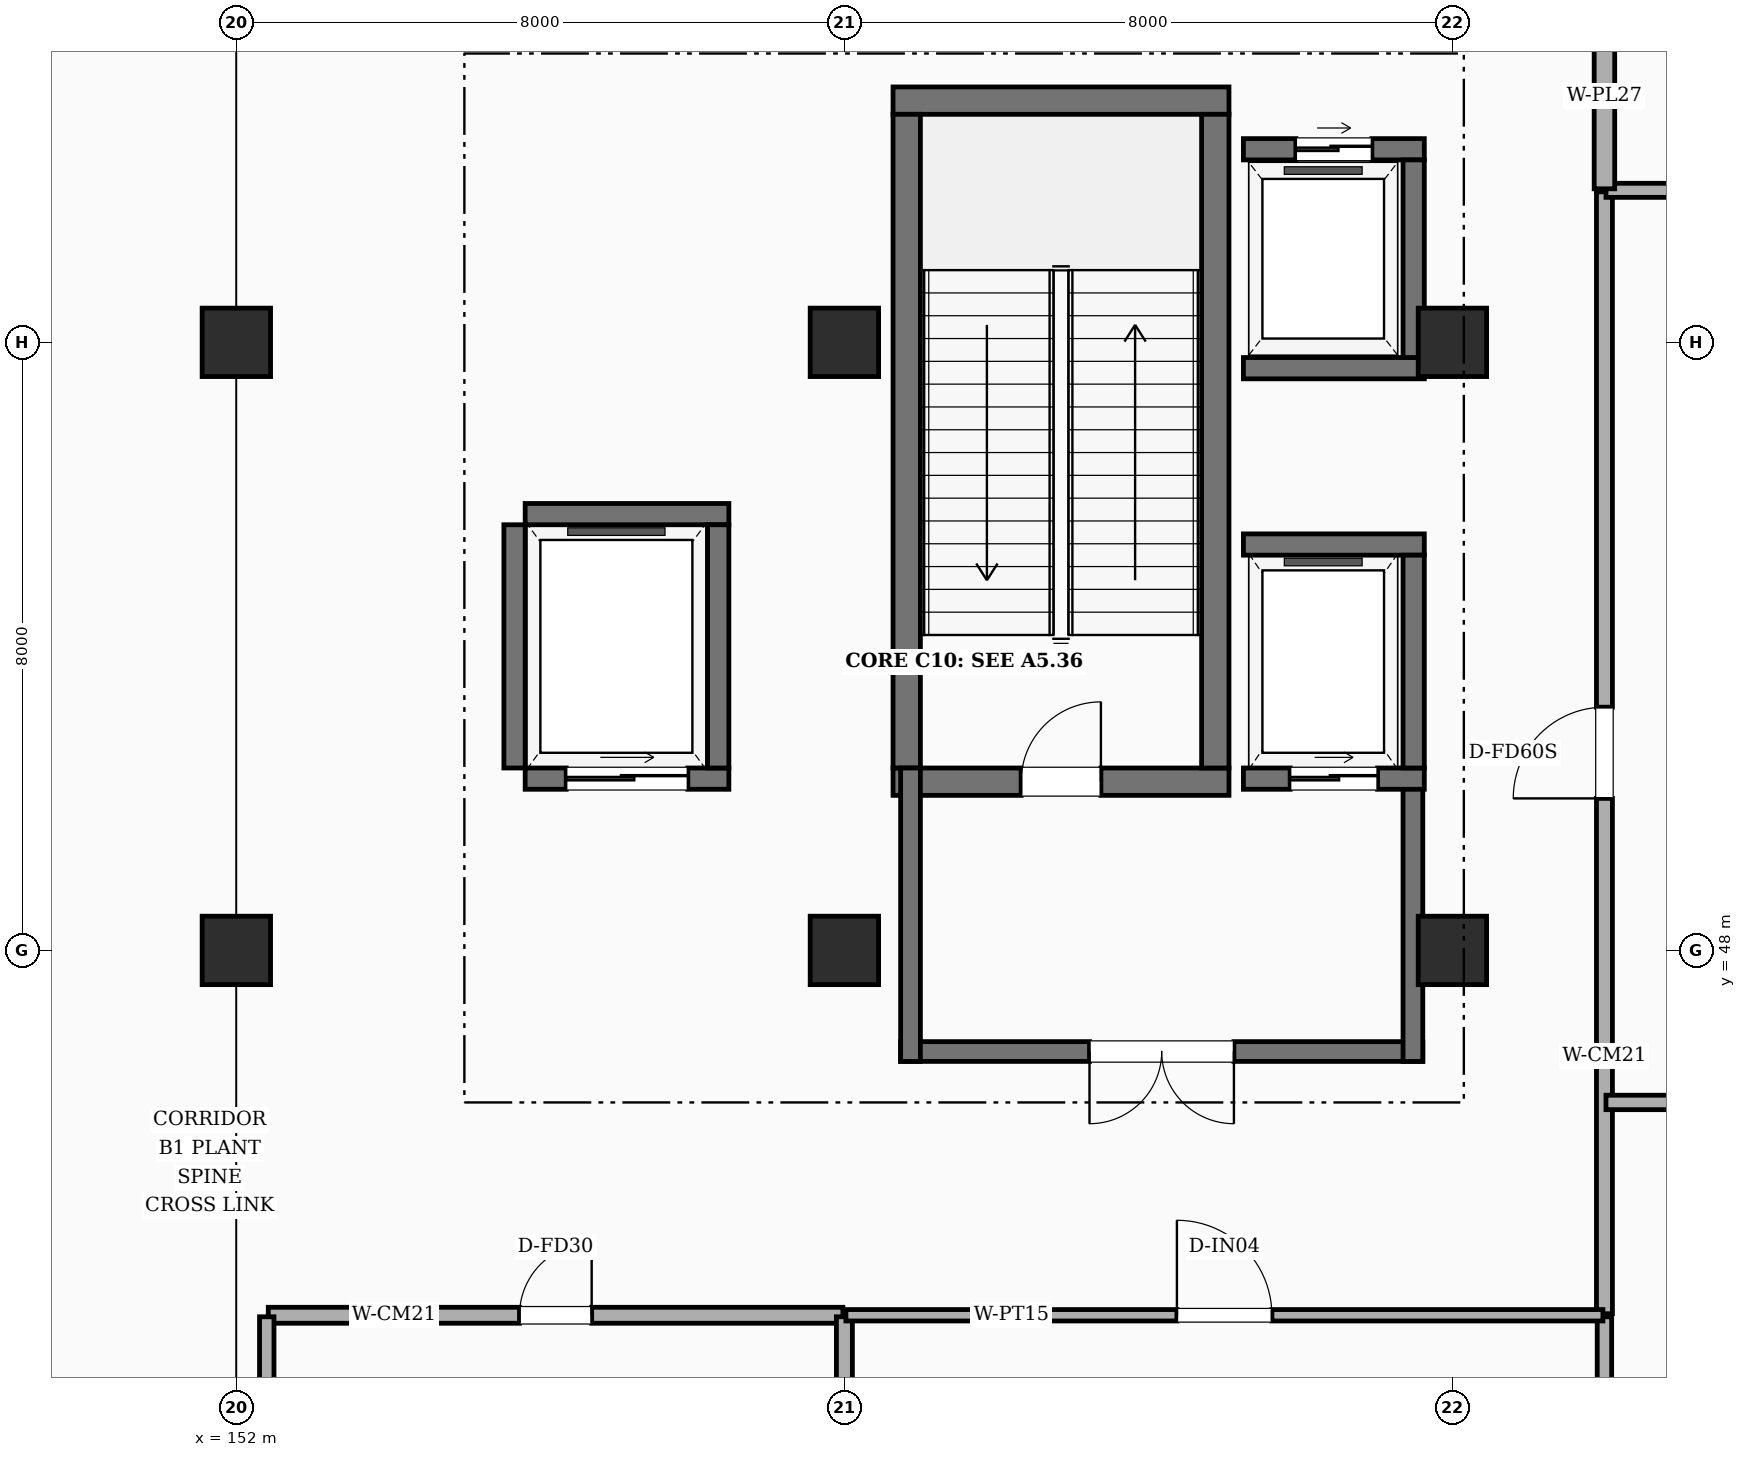
"""IFC4 building model, lengths in metres.
Left out: names, types, materials, properties, quantities, classifications, styles, units other than length and angle.
Written with IfcOpenShell. Run it as: python <this file> out.ifc"""

import sys

from ifc_helpers import new_model, si_unit, direction, frame, frame_2d, origin, origin_2d, place, context, subcontext, project, spatial, rectangle, extrude, element, fill, save


model = new_model("IFC4")
c1 = context("Model", 3, precision=1e-05, world=origin(), true_north=direction((0.0, 1.0)))
c2 = subcontext(c1, "Body", "Model", "MODEL_VIEW")
j1 = project(units=[si_unit("LENGTHUNIT", "METRE"), si_unit("PLANEANGLEUNIT", "RADIAN")], contexts=[c1])
p1 = place(None, origin())
s1 = spatial("IfcSite", under=j1, at=p1, CompositionType="ELEMENT")
p2 = place(p1, origin())
s2 = spatial("IfcBuilding", under=s1, at=p2, CompositionType="ELEMENT")
p3 = place(p2, frame((0.0, 0.0, -5.4)))
s3 = spatial("IfcBuildingStorey", under=s2, at=p3, CompositionType="ELEMENT", Elevation=-5.4)
for number, where, z_axis, x_axis in (
    (1, (152.0, 48.0, -0.4), (0.0, 0.0, 1.0), (1.0, 0.0, 0.0)),
    (2, (152.0, 56.0, -0.4), (0.0, 0.0, 1.0), (1.0, 0.0, 0.0)),
    (3, (160.0, 48.0, -0.4), (0.0, 0.0, 1.0), (1.0, 0.0, 0.0)),
    (4, (160.0, 56.0, -0.4), (0.0, 0.0, 1.0), (1.0, 0.0, 0.0)),
    (5, (168.0, 48.0, -0.4), (0.0, 0.0, 1.0), (1.0, 0.0, 0.0)),
    (6, (168.0, 56.0, -0.4), (0.0, 0.0, 1.0), (1.0, 0.0, 0.0)),
):
    element("IfcColumn", number, at=place(p3, frame(where, z_axis=z_axis, x_axis=x_axis)), inside=s3, PredefinedType="COLUMN", context=c2, shape_type="SweptSolid", body=[
        extrude(rectangle(XDim=0.9, YDim=0.9, at=origin_2d()), origin(), (0.0, 0.0, 1.0), 5.8),
    ])
p4 = place(p3, frame((160.64, 50.22, 0.0), z_axis=(0.0, 0.0, 1.0), x_axis=(1.0, 0.0, 0.0)))
e7 = element("IfcWall", 7, at=p4, inside=s3, PredefinedType="SHEAR", context=c2, shape_type="SweptSolid", body=[
    extrude(rectangle(XDim=4.42, YDim=0.36, at=frame_2d((2.21, 0.0))), origin(), (0.0, 0.0, 1.0), 5.4),
])
p5 = place(p4, frame((1.685, 0.0, 0.0)))
e8 = element("IfcOpeningElement", 8, at=p5, cuts=e7, PredefinedType="OPENING", context=c2, shape_type="SweptSolid", body=[
    extrude(rectangle(XDim=1.05, YDim=2.15, at=frame_2d((0.525, 1.075))), frame((0.0, 0.19, 0.0), z_axis=(0.0, -1.0, 0.0), x_axis=(1.0, 0.0, 0.0)), (0.0, 0.0, 1.0), 0.38),
])
p6 = place(p3, frame((160.64, 59.18, 0.0), z_axis=(0.0, 0.0, 1.0), x_axis=(1.0, 0.0, 0.0)))
e9 = element("IfcWall", 9, at=p6, inside=s3, PredefinedType="SHEAR", context=c2, shape_type="SweptSolid", body=[
    extrude(rectangle(XDim=4.42, YDim=0.36, at=frame_2d((2.21, 0.0))), origin(), (0.0, 0.0, 1.0), 5.4),
])
for number, where, z_axis, x_axis in (
    (10, (160.82, 50.4, 0.0), (0.0, 0.0, 1.0), (0.0, 1.0, 0.0)),
    (11, (164.88, 50.4, 0.0), (0.0, 0.0, 1.0), (0.0, 1.0, 0.0)),
):
    element("IfcWall", number, at=place(p3, frame(where, z_axis=z_axis, x_axis=x_axis)), inside=s3, PredefinedType="SHEAR", context=c2, shape_type="SweptSolid", body=[
        extrude(rectangle(XDim=8.6, YDim=0.36, at=frame_2d((4.3, 0.0))), origin(), (0.0, 0.0, 1.0), 5.4),
    ])
p7 = place(p3, frame((167.61, 46.67, 0.0), z_axis=(0.0, 0.0, 1.0), x_axis=(-1.0, 0.0, 0.0)))
e12 = element("IfcWall", 12, at=p7, inside=s3, PredefinedType="SHEAR", context=c2, shape_type="SweptSolid", body=[
    extrude(rectangle(XDim=6.87, YDim=0.26, at=frame_2d((3.435, 0.0))), origin(), (0.0, 0.0, 1.0), 5.4),
])
p8 = place(p7, frame((2.485, 0.0, 0.0)))
e13 = element("IfcOpeningElement", 13, at=p8, cuts=e12, PredefinedType="OPENING", context=c2, shape_type="SweptSolid", body=[
    extrude(rectangle(XDim=1.9, YDim=2.25, at=frame_2d((0.95, 1.125))), frame((0.0, 0.14, 0.0), z_axis=(0.0, -1.0, 0.0), x_axis=(1.0, 0.0, 0.0)), (0.0, 0.0, 1.0), 0.28),
])
for number, where, z_axis, x_axis in (
    (14, (160.87, 46.54, 0.0), (0.0, 0.0, 1.0), (0.0, 1.0, 0.0)),
    (15, (167.48, 46.54, 0.0), (0.0, 0.0, 1.0), (0.0, 1.0, 0.0)),
):
    element("IfcWall", number, at=place(p3, frame(where, z_axis=z_axis, x_axis=x_axis)), inside=s3, PredefinedType="SHEAR", context=c2, shape_type="SweptSolid", body=[
        extrude(rectangle(XDim=3.86, YDim=0.26, at=frame_2d((1.93, 0.0))), origin(), (0.0, 0.0, 1.0), 5.4),
    ])
p9 = place(p3, frame((165.25, 50.26, 0.0), z_axis=(0.0, 0.0, 1.0), x_axis=(1.0, 0.0, 0.0)))
e16 = element("IfcWall", 16, at=p9, inside=s3, PredefinedType="SHEAR", context=c2, shape_type="SweptSolid", body=[
    extrude(rectangle(XDim=2.38, YDim=0.28, at=frame_2d((1.19, 0.0))), origin(), (0.0, 0.0, 1.0), 5.4),
])
p10 = place(p9, frame((0.615, 0.0, 0.0)))
e17 = element("IfcOpeningElement", 17, at=p10, cuts=e16, PredefinedType="OPENING", context=c2, shape_type="SweptSolid", body=[
    extrude(rectangle(XDim=1.15, YDim=2.2, at=frame_2d((0.575, 1.1))), frame((0.0, 0.15, 0.0), z_axis=(0.0, -1.0, 0.0), x_axis=(1.0, 0.0, 0.0)), (0.0, 0.0, 1.0), 0.3),
])
p11 = place(p3, frame((165.25, 53.34, 0.0), z_axis=(0.0, 0.0, 1.0), x_axis=(1.0, 0.0, 0.0)))
e18 = element("IfcWall", 18, at=p11, inside=s3, PredefinedType="SHEAR", context=c2, shape_type="SweptSolid", body=[
    extrude(rectangle(XDim=2.38, YDim=0.28, at=frame_2d((1.19, 0.0))), origin(), (0.0, 0.0, 1.0), 5.4),
])
p12 = place(p3, frame((167.49, 50.4, 0.0), z_axis=(0.0, 0.0, 1.0), x_axis=(0.0, 1.0, 0.0)))
e19 = element("IfcWall", 19, at=p12, inside=s3, PredefinedType="SHEAR", context=c2, shape_type="SweptSolid", body=[
    extrude(rectangle(XDim=2.8, YDim=0.28, at=frame_2d((1.4, 0.0))), origin(), (0.0, 0.0, 1.0), 5.4),
])
p13 = place(p3, frame((165.25, 55.66, 0.0), z_axis=(0.0, 0.0, 1.0), x_axis=(1.0, 0.0, 0.0)))
e20 = element("IfcWall", 20, at=p13, inside=s3, PredefinedType="SHEAR", context=c2, shape_type="SweptSolid", body=[
    extrude(rectangle(XDim=2.38, YDim=0.28, at=frame_2d((1.19, 0.0))), origin(), (0.0, 0.0, 1.0), 5.4),
])
p14 = place(p3, frame((165.25, 58.54, 0.0), z_axis=(0.0, 0.0, 1.0), x_axis=(1.0, 0.0, 0.0)))
e21 = element("IfcWall", 21, at=p14, inside=s3, PredefinedType="SHEAR", context=c2, shape_type="SweptSolid", body=[
    extrude(rectangle(XDim=2.38, YDim=0.28, at=frame_2d((1.19, 0.0))), origin(), (0.0, 0.0, 1.0), 5.4),
])
p15 = place(p14, frame((0.69, 0.0, 0.0)))
e22 = element("IfcOpeningElement", 22, at=p15, cuts=e21, PredefinedType="OPENING", context=c2, shape_type="SweptSolid", body=[
    extrude(rectangle(XDim=1.0, YDim=2.15, at=frame_2d((0.5, 1.075))), frame((0.0, 0.15, 0.0), z_axis=(0.0, -1.0, 0.0), x_axis=(1.0, 0.0, 0.0)), (0.0, 0.0, 1.0), 0.3),
])
p16 = place(p3, frame((167.49, 55.8, 0.0), z_axis=(0.0, 0.0, 1.0), x_axis=(0.0, 1.0, 0.0)))
e23 = element("IfcWall", 23, at=p16, inside=s3, PredefinedType="SHEAR", context=c2, shape_type="SweptSolid", body=[
    extrude(rectangle(XDim=2.6, YDim=0.28, at=frame_2d((1.3, 0.0))), origin(), (0.0, 0.0, 1.0), 5.4),
])
p17 = place(p3, frame((155.8, 50.26, 0.0), z_axis=(0.0, 0.0, 1.0), x_axis=(1.0, 0.0, 0.0)))
e24 = element("IfcWall", 24, at=p17, inside=s3, PredefinedType="SHEAR", context=c2, shape_type="SweptSolid", body=[
    extrude(rectangle(XDim=2.68, YDim=0.28, at=frame_2d((1.34, 0.0))), origin(), (0.0, 0.0, 1.0), 5.4),
])
p18 = place(p17, frame((0.54, 0.0, 0.0)))
e25 = element("IfcOpeningElement", 25, at=p18, cuts=e24, PredefinedType="OPENING", context=c2, shape_type="SweptSolid", body=[
    extrude(rectangle(XDim=1.6, YDim=2.35, at=frame_2d((0.8, 1.175))), frame((0.0, 0.15, 0.0), z_axis=(0.0, -1.0, 0.0), x_axis=(1.0, 0.0, 0.0)), (0.0, 0.0, 1.0), 0.3),
])
p19 = place(p3, frame((155.8, 53.74, 0.0), z_axis=(0.0, 0.0, 1.0), x_axis=(1.0, 0.0, 0.0)))
e26 = element("IfcWall", 26, at=p19, inside=s3, PredefinedType="SHEAR", context=c2, shape_type="SweptSolid", body=[
    extrude(rectangle(XDim=2.68, YDim=0.28, at=frame_2d((1.34, 0.0))), origin(), (0.0, 0.0, 1.0), 5.4),
])
for number, where, z_axis, x_axis in (
    (27, (158.34, 50.4, 0.0), (0.0, 0.0, 1.0), (0.0, 1.0, 0.0)),
    (28, (155.66, 50.4, 0.0), (0.0, 0.0, 1.0), (0.0, 1.0, 0.0)),
):
    element("IfcWall", number, at=place(p3, frame(where, z_axis=z_axis, x_axis=x_axis)), inside=s3, PredefinedType="SHEAR", context=c2, shape_type="SweptSolid", body=[
        extrude(rectangle(XDim=3.2, YDim=0.28, at=frame_2d((1.6, 0.0))), origin(), (0.0, 0.0, 1.0), 5.4),
    ])
p20 = place(p3, frame((170.0, 24.02, 0.0), z_axis=(0.0, 0.0, 1.0), x_axis=(0.0, 1.0, 0.0)))
e29 = element("IfcWall", 29, at=p20, inside=s3, PredefinedType="SOLIDWALL", context=c2, shape_type="SweptSolid", body=[
    extrude(rectangle(XDim=19.16, YDim=0.19, at=frame_2d((9.58, 0.0))), origin(), (0.0, 0.0, 1.0), 4.11),
])
p21 = place(p20, frame((8.93, 0.0, 0.0)))
e30 = element("IfcOpeningElement", 30, at=p21, cuts=e29, PredefinedType="OPENING", context=c2, shape_type="SweptSolid", body=[
    extrude(rectangle(XDim=1.3, YDim=2.2, at=frame_2d((0.65, 1.1))), frame((0.0, 0.105, 0.0), z_axis=(0.0, -1.0, 0.0), x_axis=(1.0, 0.0, 0.0)), (0.0, 0.0, 1.0), 0.21),
])
p22 = place(p3, frame((170.0, 43.22, 0.0), z_axis=(0.0, 0.0, 1.0), x_axis=(0.0, 1.0, 0.0)))
e31 = element("IfcWall", 31, at=p22, inside=s3, PredefinedType="SOLIDWALL", context=c2, shape_type="SweptSolid", body=[
    extrude(rectangle(XDim=14.76, YDim=0.21, at=frame_2d((7.38, 0.0))), origin(), (0.0, 0.0, 1.0), 4.11),
])
p23 = place(p22, frame((6.78, 0.0, 0.0)))
e32 = element("IfcOpeningElement", 32, at=p23, cuts=e31, PredefinedType="OPENING", context=c2, shape_type="SweptSolid", body=[
    extrude(rectangle(XDim=1.2, YDim=2.15, at=frame_2d((0.6, 1.075))), frame((0.0, 0.115, 0.0), z_axis=(0.0, -1.0, 0.0), x_axis=(1.0, 0.0, 0.0)), (0.0, 0.0, 1.0), 0.23),
])
p24 = place(p3, frame((170.02, 46.0, 0.0), z_axis=(0.0, 0.0, 1.0), x_axis=(1.0, 0.0, 0.0)))
e33 = element("IfcWall", 33, at=p24, inside=s3, PredefinedType="SOLIDWALL", context=c2, shape_type="SweptSolid", body=[
    extrude(rectangle(XDim=5.86, YDim=0.19, at=frame_2d((2.93, 0.0))), origin(), (0.0, 0.0, 1.0), 4.36),
])
p25 = place(p3, frame((170.02, 58.0, 0.0), z_axis=(0.0, 0.0, 1.0), x_axis=(1.0, 0.0, 0.0)))
e34 = element("IfcWall", 34, at=p25, inside=s3, PredefinedType="PLUMBINGWALL", context=c2, shape_type="SweptSolid", body=[
    extrude(rectangle(XDim=5.86, YDim=0.185, at=frame_2d((2.93, 0.0))), origin(), (0.0, 0.0, 1.0), 4.36),
])
p26 = place(p3, frame((170.0, 58.02, 0.0), z_axis=(0.0, 0.0, 1.0), x_axis=(0.0, 1.0, 0.0)))
e35 = element("IfcWall", 35, at=p26, inside=s3, PredefinedType="PLUMBINGWALL", context=c2, shape_type="SweptSolid", body=[
    extrude(rectangle(XDim=5.86, YDim=0.27, at=frame_2d((2.93, 0.0))), origin(), (0.0, 0.0, 1.0), 4.11),
])
p27 = place(p26, frame((2.45, 0.0, 0.0)))
e36 = element("IfcOpeningElement", 36, at=p27, cuts=e35, PredefinedType="OPENING", context=c2, shape_type="SweptSolid", body=[
    extrude(rectangle(XDim=0.96, YDim=2.1, at=frame_2d((0.48, 1.05))), frame((0.0, 0.145, 0.0), z_axis=(0.0, -1.0, 0.0), x_axis=(1.0, 0.0, 0.0)), (0.0, 0.0, 1.0), 0.29),
])
p28 = place(p3, frame((152.42, 43.2, 0.0), z_axis=(0.0, 0.0, 1.0), x_axis=(1.0, 0.0, 0.0)))
e37 = element("IfcWall", 37, at=p28, inside=s3, PredefinedType="SOLIDWALL", context=c2, shape_type="SweptSolid", body=[
    extrude(rectangle(XDim=7.56, YDim=0.21, at=frame_2d((3.78, 0.0))), origin(), (0.0, 0.0, 1.0), 4.11),
])
p29 = place(p28, frame((3.305, 0.0, 0.0)))
e38 = element("IfcOpeningElement", 38, at=p29, cuts=e37, PredefinedType="OPENING", context=c2, shape_type="SweptSolid", body=[
    extrude(rectangle(XDim=0.95, YDim=2.1, at=frame_2d((0.475, 1.05))), frame((0.0, 0.115, 0.0), z_axis=(0.0, -1.0, 0.0), x_axis=(1.0, 0.0, 0.0)), (0.0, 0.0, 1.0), 0.23),
])
p30 = place(p3, frame((152.4, 38.02, 0.0), z_axis=(0.0, 0.0, 1.0), x_axis=(0.0, 1.0, 0.0)))
e39 = element("IfcWall", 39, at=p30, inside=s3, PredefinedType="SOLIDWALL", context=c2, shape_type="SweptSolid", body=[
    extrude(rectangle(XDim=5.16, YDim=0.19, at=frame_2d((2.58, 0.0))), origin(), (0.0, 0.0, 1.0), 4.11),
])
p31 = place(p3, frame((160.0, 24.02, 0.0), z_axis=(0.0, 0.0, 1.0), x_axis=(0.0, 1.0, 0.0)))
e40 = element("IfcWall", 40, at=p31, inside=s3, PredefinedType="SOLIDWALL", context=c2, shape_type="SweptSolid", body=[
    extrude(rectangle(XDim=19.16, YDim=0.21, at=frame_2d((9.58, 0.0))), origin(), (0.0, 0.0, 1.0), 4.11),
])
p32 = place(p3, frame((160.02, 43.2, 0.0), z_axis=(0.0, 0.0, 1.0), x_axis=(1.0, 0.0, 0.0)))
e41 = element("IfcWall", 41, at=p32, inside=s3, PredefinedType="PARTITIONING", context=c2, shape_type="SweptSolid", body=[
    extrude(rectangle(XDim=9.96, YDim=0.15, at=frame_2d((4.98, 0.0))), origin(), (0.0, 0.0, 1.0), 4.11),
])
p33 = place(p32, frame((4.355, 0.0, 0.0)))
e42 = element("IfcOpeningElement", 42, at=p33, cuts=e41, PredefinedType="OPENING", context=c2, shape_type="SweptSolid", body=[
    extrude(rectangle(XDim=1.25, YDim=2.15, at=frame_2d((0.625, 1.075))), frame((0.0, 0.085, 0.0), z_axis=(0.0, -1.0, 0.0), x_axis=(1.0, 0.0, 0.0)), (0.0, 0.0, 1.0), 0.17),
])
p34 = place(p5, origin())
e43 = element("IfcDoor", 43, at=p34, inside=s3, OperationType="SINGLE_SWING_RIGHT", PredefinedType="DOOR", context=c2, shape_type="SweptSolid", body=[
    extrude(rectangle(XDim=1.05, YDim=2.15, at=frame_2d((0.525, 1.075))), frame((0.0, 0.025, 0.0), z_axis=(0.0, -1.0, 0.0), x_axis=(1.0, 0.0, 0.0)), (0.0, 0.0, 1.0), 0.05),
])
fill(e8, e43)
p35 = place(p8, origin())
e44 = element("IfcDoor", 44, at=p35, inside=s3, OperationType="DOUBLE_DOOR_SINGLE_SWING", PredefinedType="DOOR", context=c2, shape_type="SweptSolid", body=[
    extrude(rectangle(XDim=1.9, YDim=2.25, at=frame_2d((0.95, 1.125))), frame((0.0, 0.025, 0.0), z_axis=(0.0, -1.0, 0.0), x_axis=(1.0, 0.0, 0.0)), (0.0, 0.0, 1.0), 0.05),
])
fill(e13, e44)
p36 = place(p10, origin())
e45 = element("IfcDoor", 45, at=p36, inside=s3, OperationType="SLIDING_TO_LEFT", PredefinedType="DOOR", context=c2, shape_type="SweptSolid", body=[
    extrude(rectangle(XDim=1.15, YDim=2.2, at=frame_2d((0.575, 1.1))), frame((0.0, 0.025, 0.0), z_axis=(0.0, -1.0, 0.0), x_axis=(1.0, 0.0, 0.0)), (0.0, 0.0, 1.0), 0.05),
])
fill(e17, e45)
p37 = place(p15, origin())
e46 = element("IfcDoor", 46, at=p37, inside=s3, OperationType="SLIDING_TO_LEFT", PredefinedType="DOOR", context=c2, shape_type="SweptSolid", body=[
    extrude(rectangle(XDim=1.0, YDim=2.15, at=frame_2d((0.5, 1.075))), frame((0.0, 0.025, 0.0), z_axis=(0.0, -1.0, 0.0), x_axis=(1.0, 0.0, 0.0)), (0.0, 0.0, 1.0), 0.05),
])
fill(e22, e46)
p38 = place(p18, origin())
e47 = element("IfcDoor", 47, at=p38, inside=s3, OperationType="SLIDING_TO_LEFT", PredefinedType="DOOR", context=c2, shape_type="SweptSolid", body=[
    extrude(rectangle(XDim=1.6, YDim=2.35, at=frame_2d((0.8, 1.175))), frame((0.0, 0.025, 0.0), z_axis=(0.0, -1.0, 0.0), x_axis=(1.0, 0.0, 0.0)), (0.0, 0.0, 1.0), 0.05),
])
fill(e25, e47)
p39 = place(p23, origin())
e48 = element("IfcDoor", 48, at=p39, inside=s3, OperationType="SINGLE_SWING_LEFT", PredefinedType="DOOR", context=c2, shape_type="SweptSolid", body=[
    extrude(rectangle(XDim=1.2, YDim=2.15, at=frame_2d((0.6, 1.075))), frame((0.0, 0.025, 0.0), z_axis=(0.0, -1.0, 0.0), x_axis=(1.0, 0.0, 0.0)), (0.0, 0.0, 1.0), 0.05),
])
fill(e32, e48)
p40 = place(p29, origin())
e49 = element("IfcDoor", 49, at=p40, inside=s3, OperationType="SINGLE_SWING_RIGHT", PredefinedType="DOOR", context=c2, shape_type="SweptSolid", body=[
    extrude(rectangle(XDim=0.95, YDim=2.1, at=frame_2d((0.475, 1.05))), frame((0.0, 0.025, 0.0), z_axis=(0.0, -1.0, 0.0), x_axis=(1.0, 0.0, 0.0)), (0.0, 0.0, 1.0), 0.05),
])
fill(e38, e49)
p41 = place(p33, origin())
e50 = element("IfcDoor", 50, at=p41, inside=s3, OperationType="SINGLE_SWING_LEFT", PredefinedType="DOOR", context=c2, shape_type="SweptSolid", body=[
    extrude(rectangle(XDim=1.25, YDim=2.15, at=frame_2d((0.625, 1.075))), frame((0.0, 0.025, 0.0), z_axis=(0.0, -1.0, 0.0), x_axis=(1.0, 0.0, 0.0)), (0.0, 0.0, 1.0), 0.05),
])
fill(e42, e50)
save(model, sys.argv[1])
